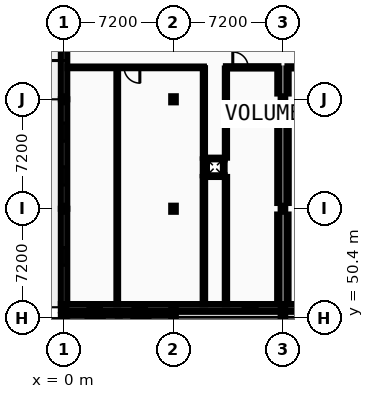
"""IFC4 building model, lengths in metres.
Left out: names, types, materials, properties, quantities, classifications, styles, units other than length and angle.
Written with IfcOpenShell. Run it as: python <this file> out.ifc"""

import sys

from ifc_helpers import new_model, si_unit, direction, frame, frame_2d, origin, origin_2d, place, context, subcontext, project, spatial, rectangle, i_section, extrude, element, fill, save


model = new_model("IFC4")
c1 = context("Model", 3, precision=1e-05, world=origin(), true_north=direction((0.0, 1.0)))
c2 = subcontext(c1, "Body", "Model", "MODEL_VIEW")
j1 = project(units=[si_unit("LENGTHUNIT", "METRE"), si_unit("PLANEANGLEUNIT", "RADIAN")], contexts=[c1])
p1 = place(None, origin())
s1 = spatial("IfcSite", under=j1, at=p1, CompositionType="ELEMENT")
p2 = place(p1, origin())
s2 = spatial("IfcBuilding", under=s1, at=p2, CompositionType="ELEMENT")
p3 = place(p2, origin())
s3 = spatial("IfcBuildingStorey", under=s2, at=p3, CompositionType="ELEMENT", Elevation=0.0)
p4 = place(p3, frame((0.0, 50.4, 0.0), z_axis=(0.0, 0.0, 1.0), x_axis=(1.0, 0.0, 0.0)))
e1 = element("IfcColumn", 1, at=p4, inside=s3, PredefinedType="COLUMN", context=c2, shape_type="SweptSolid", body=[
    extrude(i_section(OverallWidth=0.3, OverallDepth=0.45, WebThickness=0.014, FlangeThickness=0.026, FilletRadius=0.027, at=origin_2d()), origin(), (0.0, 0.0, 1.0), 5.2),
])
p5 = place(p3, frame((0.0, 51.12, 0.0), z_axis=(0.0, 0.0, 1.0), x_axis=(1.0, 0.0, 0.0)))
e2 = element("IfcColumn", 2, at=p5, inside=s3, PredefinedType="COLUMN", context=c2, shape_type="SweptSolid", body=[
    extrude(i_section(OverallWidth=0.3, OverallDepth=0.36, WebThickness=0.012, FlangeThickness=0.022, FilletRadius=0.027, at=origin_2d()), origin(), (0.0, 0.0, 1.0), 5.2),
])
for number, where, z_axis, x_axis in (
    (3, (0.0, 57.6, 0.0), (0.0, 0.0, 1.0), (1.0, 0.0, 0.0)),
    (4, (0.0, 64.8, 0.0), (0.0, 0.0, 1.0), (1.0, 0.0, 0.0)),
):
    element("IfcColumn", number, at=place(p3, frame(where, z_axis=z_axis, x_axis=x_axis)), inside=s3, PredefinedType="COLUMN", context=c2, shape_type="SweptSolid", body=[
        extrude(i_section(OverallWidth=0.3, OverallDepth=0.4, WebThickness=0.013, FlangeThickness=0.024, FilletRadius=0.027, at=origin_2d()), origin(), (0.0, 0.0, 1.0), 5.2),
    ])
p6 = place(p3, frame((7.2, 50.4, 0.0), z_axis=(0.0, 0.0, 1.0), x_axis=(1.0, 0.0, 0.0)))
e5 = element("IfcColumn", 5, at=p6, inside=s3, PredefinedType="COLUMN", context=c2, shape_type="SweptSolid", body=[
    extrude(i_section(OverallWidth=0.3, OverallDepth=0.45, WebThickness=0.014, FlangeThickness=0.026, FilletRadius=0.027, at=origin_2d()), origin(), (0.0, 0.0, 1.0), 5.2),
])
p7 = place(p3, frame((7.2, 51.12, 0.0), z_axis=(0.0, 0.0, 1.0), x_axis=(1.0, 0.0, 0.0)))
e6 = element("IfcColumn", 6, at=p7, inside=s3, PredefinedType="COLUMN", context=c2, shape_type="SweptSolid", body=[
    extrude(i_section(OverallWidth=0.3, OverallDepth=0.36, WebThickness=0.012, FlangeThickness=0.022, FilletRadius=0.027, at=origin_2d()), origin(), (0.0, 0.0, 1.0), 5.2),
])
for number, where, z_axis, x_axis in (
    (7, (7.2, 57.6, 0.0), (0.0, 0.0, 1.0), (1.0, 0.0, 0.0)),
    (8, (7.2, 64.8, 0.0), (0.0, 0.0, 1.0), (1.0, 0.0, 0.0)),
):
    element("IfcColumn", number, at=place(p3, frame(where, z_axis=z_axis, x_axis=x_axis)), inside=s3, PredefinedType="COLUMN", context=c2, shape_type="SweptSolid", body=[
        extrude(i_section(OverallWidth=0.3, OverallDepth=0.4, WebThickness=0.013, FlangeThickness=0.024, FilletRadius=0.027, at=origin_2d()), origin(), (0.0, 0.0, 1.0), 5.2),
    ])
p8 = place(p3, frame((14.4, 50.4, 0.0), z_axis=(0.0, 0.0, 1.0), x_axis=(1.0, 0.0, 0.0)))
e9 = element("IfcColumn", 9, at=p8, inside=s3, PredefinedType="COLUMN", context=c2, shape_type="SweptSolid", body=[
    extrude(i_section(OverallWidth=0.3, OverallDepth=0.45, WebThickness=0.014, FlangeThickness=0.026, FilletRadius=0.027, at=origin_2d()), origin(), (0.0, 0.0, 1.0), 5.2),
])
p9 = place(p3, frame((14.4, 51.12, 0.0), z_axis=(0.0, 0.0, 1.0), x_axis=(1.0, 0.0, 0.0)))
e10 = element("IfcColumn", 10, at=p9, inside=s3, PredefinedType="COLUMN", context=c2, shape_type="SweptSolid", body=[
    extrude(i_section(OverallWidth=0.3, OverallDepth=0.36, WebThickness=0.012, FlangeThickness=0.022, FilletRadius=0.027, at=origin_2d()), origin(), (0.0, 0.0, 1.0), 5.2),
])
for number, where, z_axis, x_axis in (
    (11, (14.4, 57.6, 0.0), (0.0, 0.0, 1.0), (1.0, 0.0, 0.0)),
    (12, (14.4, 64.8, 0.0), (0.0, 0.0, 1.0), (1.0, 0.0, 0.0)),
):
    element("IfcColumn", number, at=place(p3, frame(where, z_axis=z_axis, x_axis=x_axis)), inside=s3, PredefinedType="COLUMN", context=c2, shape_type="SweptSolid", body=[
        extrude(i_section(OverallWidth=0.3, OverallDepth=0.4, WebThickness=0.013, FlangeThickness=0.024, FilletRadius=0.027, at=origin_2d()), origin(), (0.0, 0.0, 1.0), 5.2),
    ])
p10 = place(p3, frame((7.31, 50.4, 0.0), z_axis=(0.0, 0.0, 1.0), x_axis=(-1.0, 0.0, 0.0)))
e13 = element("IfcWall", 13, at=p10, inside=s3, PredefinedType="STANDARD", context=c2, shape_type="SweptSolid", body=[
    extrude(rectangle(XDim=7.52, YDim=0.42, at=frame_2d((3.76, 0.0))), origin(), (0.0, 0.0, 1.0), 4.665),
])
p11 = place(p10, frame((1.656, 0.0, 0.9)))
e14 = element("IfcOpeningElement", 14, at=p11, cuts=e13, PredefinedType="OPENING", context=c2, shape_type="SweptSolid", body=[
    extrude(rectangle(XDim=1.2, YDim=1.8, at=frame_2d((0.6, 0.9))), frame((0.0, 0.22, 0.0), z_axis=(0.0, -1.0, 0.0), x_axis=(1.0, 0.0, 0.0)), (0.0, 0.0, 1.0), 0.44),
])
p12 = place(p10, frame((4.664, 0.0, 0.9)))
e15 = element("IfcOpeningElement", 15, at=p12, cuts=e13, PredefinedType="OPENING", context=c2, shape_type="SweptSolid", body=[
    extrude(rectangle(XDim=1.2, YDim=1.8, at=frame_2d((0.6, 0.9))), frame((0.0, 0.22, 0.0), z_axis=(0.0, -1.0, 0.0), x_axis=(1.0, 0.0, 0.0)), (0.0, 0.0, 1.0), 0.44),
])
p13 = place(p3, frame((-0.21, 51.12, 0.0), z_axis=(0.0, 0.0, 1.0), x_axis=(1.0, 0.0, 0.0)))
e16 = element("IfcWall", 16, at=p13, inside=s3, PredefinedType="STANDARD", context=c2, shape_type="SweptSolid", body=[
    extrude(rectangle(XDim=7.41, YDim=0.42, at=frame_2d((3.705, 0.0))), origin(), (0.0, 0.0, 1.0), 4.635),
])
p14 = place(p13, frame((1.776, 0.0, 0.95)))
e17 = element("IfcOpeningElement", 17, at=p14, cuts=e16, PredefinedType="OPENING", context=c2, shape_type="SweptSolid", body=[
    extrude(rectangle(XDim=0.894, YDim=1.404, at=frame_2d((0.447, 0.702))), frame((0.0, 0.22, 0.0), z_axis=(0.0, -1.0, 0.0), x_axis=(1.0, 0.0, 0.0)), (0.0, 0.0, 1.0), 0.44),
])
p15 = place(p13, frame((4.74, 0.0, 0.95)))
e18 = element("IfcOpeningElement", 18, at=p15, cuts=e16, PredefinedType="OPENING", context=c2, shape_type="SweptSolid", body=[
    extrude(rectangle(XDim=0.894, YDim=1.404, at=frame_2d((0.447, 0.702))), frame((0.0, 0.22, 0.0), z_axis=(0.0, -1.0, 0.0), x_axis=(1.0, 0.0, 0.0)), (0.0, 0.0, 1.0), 0.44),
])
p16 = place(p3, frame((7.2, 51.12, 0.0), z_axis=(0.0, 0.0, 1.0), x_axis=(1.0, 0.0, 0.0)))
e19 = element("IfcWall", 19, at=p16, inside=s3, PredefinedType="STANDARD", context=c2, shape_type="SweptSolid", body=[
    extrude(rectangle(XDim=7.2, YDim=0.42, at=frame_2d((3.6, 0.0))), origin(), (0.0, 0.0, 1.0), 4.635),
])
p17 = place(p16, frame((4.576, 0.0, 0.95)))
e20 = element("IfcOpeningElement", 20, at=p17, cuts=e19, PredefinedType="OPENING", context=c2, shape_type="SweptSolid", body=[
    extrude(rectangle(XDim=0.928, YDim=1.404, at=frame_2d((0.464, 0.702))), frame((0.0, 0.22, 0.0), z_axis=(0.0, -1.0, 0.0), x_axis=(1.0, 0.0, 0.0)), (0.0, 0.0, 1.0), 0.44),
])
p18 = place(p3, frame((14.4, 51.12, 0.0), z_axis=(0.0, 0.0, 1.0), x_axis=(1.0, 0.0, 0.0)))
e21 = element("IfcWall", 21, at=p18, inside=s3, PredefinedType="STANDARD", context=c2, shape_type="SweptSolid", body=[
    extrude(rectangle(XDim=7.2, YDim=0.42, at=frame_2d((3.6, 0.0))), origin(), (0.0, 0.0, 1.0), 4.635),
])
p19 = place(p18, frame((1.679, 0.0, 0.95)))
e22 = element("IfcOpeningElement", 22, at=p19, cuts=e21, PredefinedType="OPENING", context=c2, shape_type="SweptSolid", body=[
    extrude(rectangle(XDim=0.962, YDim=1.404, at=frame_2d((0.481, 0.702))), frame((0.0, 0.22, 0.0), z_axis=(0.0, -1.0, 0.0), x_axis=(1.0, 0.0, 0.0)), (0.0, 0.0, 1.0), 0.44),
])
p20 = place(p18, frame((4.559, 0.0, 0.95)))
e23 = element("IfcOpeningElement", 23, at=p20, cuts=e21, PredefinedType="OPENING", context=c2, shape_type="SweptSolid", body=[
    extrude(rectangle(XDim=0.962, YDim=1.404, at=frame_2d((0.481, 0.702))), frame((0.0, 0.22, 0.0), z_axis=(0.0, -1.0, 0.0), x_axis=(1.0, 0.0, 0.0)), (0.0, 0.0, 1.0), 0.44),
])
p21 = place(p3, frame((0.0, 57.6, 0.0), z_axis=(0.0, 0.0, 1.0), x_axis=(0.0, -1.0, 0.0)))
e24 = element("IfcWall", 24, at=p21, inside=s3, PredefinedType="STANDARD", context=c2, shape_type="SweptSolid", body=[
    extrude(rectangle(XDim=6.27, YDim=0.42, at=frame_2d((3.135, 0.0))), origin(), (0.0, 0.0, 1.0), 4.565),
])
p22 = place(p21, frame((2.552, 0.0, 0.95)))
e25 = element("IfcOpeningElement", 25, at=p22, cuts=e24, PredefinedType="OPENING", context=c2, shape_type="SweptSolid", body=[
    extrude(rectangle(XDim=1.166, YDim=1.404, at=frame_2d((0.583, 0.702))), frame((0.0, 0.22, 0.0), z_axis=(0.0, -1.0, 0.0), x_axis=(1.0, 0.0, 0.0)), (0.0, 0.0, 1.0), 0.44),
])
p23 = place(p3, frame((0.0, 64.8, 0.0), z_axis=(0.0, 0.0, 1.0), x_axis=(0.0, -1.0, 0.0)))
e26 = element("IfcWall", 26, at=p23, inside=s3, PredefinedType="STANDARD", context=c2, shape_type="SweptSolid", body=[
    extrude(rectangle(XDim=7.2, YDim=0.42, at=frame_2d((3.6, 0.0))), origin(), (0.0, 0.0, 1.0), 4.565),
])
p24 = place(p23, frame((1.56, 0.0, 0.95)))
e27 = element("IfcOpeningElement", 27, at=p24, cuts=e26, PredefinedType="OPENING", context=c2, shape_type="SweptSolid", body=[
    extrude(rectangle(XDim=1.2, YDim=1.404, at=frame_2d((0.6, 0.702))), frame((0.0, 0.22, 0.0), z_axis=(0.0, -1.0, 0.0), x_axis=(1.0, 0.0, 0.0)), (0.0, 0.0, 1.0), 0.44),
])
p25 = place(p23, frame((4.44, 0.0, 0.95)))
e28 = element("IfcOpeningElement", 28, at=p25, cuts=e26, PredefinedType="OPENING", context=c2, shape_type="SweptSolid", body=[
    extrude(rectangle(XDim=1.2, YDim=1.404, at=frame_2d((0.6, 0.702))), frame((0.0, 0.22, 0.0), z_axis=(0.0, -1.0, 0.0), x_axis=(1.0, 0.0, 0.0)), (0.0, 0.0, 1.0), 0.44),
])
p26 = place(p3, frame((0.0, 72.0, 0.0), z_axis=(0.0, 0.0, 1.0), x_axis=(0.0, -1.0, 0.0)))
e29 = element("IfcWall", 29, at=p26, inside=s3, PredefinedType="STANDARD", context=c2, shape_type="SweptSolid", body=[
    extrude(rectangle(XDim=7.2, YDim=0.42, at=frame_2d((3.6, 0.0))), origin(), (0.0, 0.0, 1.0), 4.565),
])
p27 = place(p26, frame((2.55, 0.0, 0.0)))
e30 = element("IfcOpeningElement", 30, at=p27, cuts=e29, PredefinedType="OPENING", context=c2, shape_type="SweptSolid", body=[
    extrude(rectangle(XDim=2.1, YDim=2.4, at=frame_2d((1.05, 1.2))), frame((0.0, 0.22, 0.0), z_axis=(0.0, -1.0, 0.0), x_axis=(1.0, 0.0, 0.0)), (0.0, 0.0, 1.0), 0.44),
])
for number, where, z_axis, x_axis in (
    (31, (9.29, 59.745, 0.0), (0.0, 0.0, 1.0), (1.0, 0.0, 0.0)),
    (32, (9.29, 60.905, 0.0), (0.0, 0.0, 1.0), (1.0, 0.0, 0.0)),
):
    element("IfcWall", number, at=place(p3, frame(where, z_axis=z_axis, x_axis=x_axis)), inside=s3, PredefinedType="PARTITIONING", context=c2, shape_type="SweptSolid", body=[
        extrude(rectangle(XDim=1.27, YDim=0.11, at=frame_2d((0.635, 0.0))), origin(), (0.0, 0.0, 1.0), 4.94),
    ])
for number, where, z_axis, x_axis in (
    (33, (9.345, 59.8, 0.0), (0.0, 0.0, 1.0), (0.0, 1.0, 0.0)),
    (34, (10.505, 59.8, 0.0), (0.0, 0.0, 1.0), (0.0, 1.0, 0.0)),
):
    element("IfcWall", number, at=place(p3, frame(where, z_axis=z_axis, x_axis=x_axis)), inside=s3, PredefinedType="PARTITIONING", context=c2, shape_type="SweptSolid", body=[
        extrude(rectangle(XDim=1.05, YDim=0.11, at=frame_2d((0.525, 0.0))), origin(), (0.0, 0.0, 1.0), 4.94),
    ])
p28 = place(p3, frame((0.23, 66.9, 0.0), z_axis=(0.0, 0.0, 1.0), x_axis=(1.0, 0.0, 0.0)))
e35 = element("IfcWall", 35, at=p28, inside=s3, PredefinedType="PARTITIONING", context=c2, shape_type="SweptSolid", body=[
    extrude(rectangle(XDim=8.97, YDim=0.11, at=frame_2d((4.485, 0.0))), origin(), (0.0, 0.0, 1.0), 4.94),
])
p29 = place(p28, frame((1.82, 0.0, 0.0)))
e36 = element("IfcOpeningElement", 36, at=p29, cuts=e35, PredefinedType="OPENING", context=c2, shape_type="SweptSolid", body=[
    extrude(rectangle(XDim=1.0, YDim=2.1, at=frame_2d((0.5, 1.05))), frame((0.0, 0.065, 0.0), z_axis=(0.0, -1.0, 0.0), x_axis=(1.0, 0.0, 0.0)), (0.0, 0.0, 1.0), 0.13),
])
p30 = place(p28, frame((3.72, 0.0, 0.0)))
e37 = element("IfcOpeningElement", 37, at=p30, cuts=e35, PredefinedType="OPENING", context=c2, shape_type="SweptSolid", body=[
    extrude(rectangle(XDim=1.036, YDim=2.096, at=frame_2d((0.518, 1.048))), frame((0.0, 0.065, 0.0), z_axis=(0.0, -1.0, 0.0), x_axis=(1.0, 0.0, 0.0)), (0.0, 0.0, 1.0), 0.13),
])
p31 = place(p3, frame((10.65, 66.9, 0.0), z_axis=(0.0, 0.0, 1.0), x_axis=(1.0, 0.0, 0.0)))
e38 = element("IfcWall", 38, at=p31, inside=s3, PredefinedType="PARTITIONING", context=c2, shape_type="SweptSolid", body=[
    extrude(rectangle(XDim=3.45, YDim=0.15, at=frame_2d((1.725, 0.0))), origin(), (0.0, 0.0, 1.0), 4.94),
])
p32 = place(p31, frame((0.45, 0.0, 0.0)))
e39 = element("IfcOpeningElement", 39, at=p32, cuts=e38, PredefinedType="OPENING", context=c2, shape_type="SweptSolid", body=[
    extrude(rectangle(XDim=1.01, YDim=2.096, at=frame_2d((0.505, 1.048))), frame((0.0, 0.085, 0.0), z_axis=(0.0, -1.0, 0.0), x_axis=(1.0, 0.0, 0.0)), (0.0, 0.0, 1.0), 0.17),
])
p33 = place(p3, frame((14.7, 66.9, 0.0), z_axis=(0.0, 0.0, 1.0), x_axis=(1.0, 0.0, 0.0)))
e40 = element("IfcWall", 40, at=p33, inside=s3, PredefinedType="PARTITIONING", context=c2, shape_type="SweptSolid", body=[
    extrude(rectangle(XDim=13.9, YDim=0.142, at=frame_2d((6.95, 0.0))), origin(), (0.0, 0.0, 1.0), 4.94),
])
p34 = place(p33, frame((10.319, 0.0, 0.0)))
e41 = element("IfcOpeningElement", 41, at=p34, cuts=e40, PredefinedType="OPENING", context=c2, shape_type="SweptSolid", body=[
    extrude(rectangle(XDim=1.062, YDim=2.096, at=frame_2d((0.531, 1.048))), frame((0.0, 0.081, 0.0), z_axis=(0.0, -1.0, 0.0), x_axis=(1.0, 0.0, 0.0)), (0.0, 0.0, 1.0), 0.162),
])
p35 = place(p33, frame((3.356, 0.0, 0.0)))
e42 = element("IfcOpeningElement", 42, at=p35, cuts=e40, PredefinedType="OPENING", context=c2, shape_type="SweptSolid", body=[
    extrude(rectangle(XDim=1.088, YDim=2.096, at=frame_2d((0.544, 1.048))), frame((0.0, 0.081, 0.0), z_axis=(0.0, -1.0, 0.0), x_axis=(1.0, 0.0, 0.0)), (0.0, 0.0, 1.0), 0.162),
])
p36 = place(p3, frame((3.5, 51.32, 0.0), z_axis=(0.0, 0.0, 1.0), x_axis=(0.0, 1.0, 0.0)))
e43 = element("IfcWall", 43, at=p36, inside=s3, PredefinedType="PARTITIONING", context=c2, shape_type="SweptSolid", body=[
    extrude(rectangle(XDim=15.525, YDim=0.11, at=frame_2d((7.762, 0.0))), origin(), (0.0, 0.0, 1.0), 4.94),
])
p37 = place(p3, frame((9.2, 51.32, 0.0), z_axis=(0.0, 0.0, 1.0), x_axis=(0.0, 1.0, 0.0)))
e44 = element("IfcWall", 44, at=p37, inside=s3, PredefinedType="PARTITIONING", context=c2, shape_type="SweptSolid", body=[
    extrude(rectangle(XDim=8.37, YDim=0.16, at=frame_2d((4.185, 0.0))), origin(), (0.0, 0.0, 1.0), 4.94),
])
p38 = place(p3, frame((9.2, 59.8, 0.0), z_axis=(0.0, 0.0, 1.0), x_axis=(0.0, 1.0, 0.0)))
e45 = element("IfcWall", 45, at=p38, inside=s3, PredefinedType="PARTITIONING", context=c2, shape_type="SweptSolid", body=[
    extrude(rectangle(XDim=1.05, YDim=0.15, at=frame_2d((0.525, 0.0))), origin(), (0.0, 0.0, 1.0), 4.94),
])
p39 = place(p3, frame((9.2, 60.96, 0.0), z_axis=(0.0, 0.0, 1.0), x_axis=(0.0, 1.0, 0.0)))
e46 = element("IfcWall", 46, at=p39, inside=s3, PredefinedType="PARTITIONING", context=c2, shape_type="SweptSolid", body=[
    extrude(rectangle(XDim=5.885, YDim=0.142, at=frame_2d((2.942, 0.0))), origin(), (0.0, 0.0, 1.0), 4.94),
])
p40 = place(p3, frame((10.65, 51.32, 0.0), z_axis=(0.0, 0.0, 1.0), x_axis=(0.0, 1.0, 0.0)))
e47 = element("IfcWall", 47, at=p40, inside=s3, PredefinedType="PARTITIONING", context=c2, shape_type="SweptSolid", body=[
    extrude(rectangle(XDim=8.37, YDim=0.15, at=frame_2d((4.185, 0.0))), origin(), (0.0, 0.0, 1.0), 4.94),
])
p41 = place(p3, frame((10.65, 60.96, 0.0), z_axis=(0.0, 0.0, 1.0), x_axis=(0.0, 1.0, 0.0)))
e48 = element("IfcWall", 48, at=p41, inside=s3, PredefinedType="PARTITIONING", context=c2, shape_type="SweptSolid", body=[
    extrude(rectangle(XDim=5.865, YDim=0.142, at=frame_2d((2.933, 0.0))), origin(), (0.0, 0.0, 1.0), 4.94),
])
p42 = place(p3, frame((14.1, 51.5, 0.0), z_axis=(0.0, 0.0, 1.0), x_axis=(0.0, 1.0, 0.0)))
e49 = element("IfcWall", 49, at=p42, inside=s3, PredefinedType="PARTITIONING", context=c2, shape_type="SweptSolid", body=[
    extrude(rectangle(XDim=5.72, YDim=0.16, at=frame_2d((2.86, 0.0))), origin(), (0.0, 0.0, 1.0), 4.635),
])
p43 = place(p3, frame((14.1, 57.98, 0.0), z_axis=(0.0, 0.0, 1.0), x_axis=(0.0, 1.0, 0.0)))
e50 = element("IfcWall", 50, at=p43, inside=s3, PredefinedType="PARTITIONING", context=c2, shape_type="SweptSolid", body=[
    extrude(rectangle(XDim=6.44, YDim=0.15, at=frame_2d((3.22, 0.0))), origin(), (0.0, 0.0, 1.0), 4.635),
])
p44 = place(p3, frame((14.1, 65.18, 0.0), z_axis=(0.0, 0.0, 1.0), x_axis=(0.0, 1.0, 0.0)))
e51 = element("IfcWall", 51, at=p44, inside=s3, PredefinedType="PARTITIONING", context=c2, shape_type="SweptSolid", body=[
    extrude(rectangle(XDim=1.645, YDim=0.142, at=frame_2d((0.823, 0.0))), origin(), (0.0, 0.0, 1.0), 4.635),
])
p45 = place(p3, frame((14.7, 51.5, 0.0), z_axis=(0.0, 0.0, 1.0), x_axis=(0.0, 1.0, 0.0)))
e52 = element("IfcWall", 52, at=p45, inside=s3, PredefinedType="PARTITIONING", context=c2, shape_type="SweptSolid", body=[
    extrude(rectangle(XDim=5.72, YDim=0.135, at=frame_2d((2.86, 0.0))), origin(), (0.0, 0.0, 1.0), 4.94),
])
p46 = place(p3, frame((14.7, 57.98, 0.0), z_axis=(0.0, 0.0, 1.0), x_axis=(0.0, 1.0, 0.0)))
e53 = element("IfcWall", 53, at=p46, inside=s3, PredefinedType="PARTITIONING", context=c2, shape_type="SweptSolid", body=[
    extrude(rectangle(XDim=6.44, YDim=0.16, at=frame_2d((3.22, 0.0))), origin(), (0.0, 0.0, 1.0), 4.635),
])
p47 = place(p3, frame((14.7, 65.18, 0.0), z_axis=(0.0, 0.0, 1.0), x_axis=(0.0, 1.0, 0.0)))
e54 = element("IfcWall", 54, at=p47, inside=s3, PredefinedType="PARTITIONING", context=c2, shape_type="SweptSolid", body=[
    extrude(rectangle(XDim=1.649, YDim=0.15, at=frame_2d((0.825, 0.0))), origin(), (0.0, 0.0, 1.0), 4.635),
])
p48 = place(p11, origin())
e55 = element("IfcWindow", 55, at=p48, inside=s3, PartitioningType="SINGLE_PANEL", PredefinedType="WINDOW", context=c2, shape_type="SweptSolid", body=[
    extrude(rectangle(XDim=1.2, YDim=1.8, at=frame_2d((0.6, 0.9))), frame((0.0, 0.03, 0.0), z_axis=(0.0, -1.0, 0.0), x_axis=(1.0, 0.0, 0.0)), (0.0, 0.0, 1.0), 0.06),
])
fill(e14, e55)
p49 = place(p12, origin())
e56 = element("IfcWindow", 56, at=p49, inside=s3, PartitioningType="SINGLE_PANEL", PredefinedType="WINDOW", context=c2, shape_type="SweptSolid", body=[
    extrude(rectangle(XDim=1.2, YDim=1.8, at=frame_2d((0.6, 0.9))), frame((0.0, 0.03, 0.0), z_axis=(0.0, -1.0, 0.0), x_axis=(1.0, 0.0, 0.0)), (0.0, 0.0, 1.0), 0.06),
])
fill(e15, e56)
p50 = place(p14, origin())
e57 = element("IfcWindow", 57, at=p50, inside=s3, PartitioningType="SINGLE_PANEL", PredefinedType="WINDOW", context=c2, shape_type="SweptSolid", body=[
    extrude(rectangle(XDim=0.894, YDim=1.404, at=frame_2d((0.447, 0.702))), frame((0.0, 0.03, 0.0), z_axis=(0.0, -1.0, 0.0), x_axis=(1.0, 0.0, 0.0)), (0.0, 0.0, 1.0), 0.06),
])
fill(e17, e57)
p51 = place(p15, origin())
e58 = element("IfcWindow", 58, at=p51, inside=s3, PartitioningType="SINGLE_PANEL", PredefinedType="WINDOW", context=c2, shape_type="SweptSolid", body=[
    extrude(rectangle(XDim=0.894, YDim=1.404, at=frame_2d((0.447, 0.702))), frame((0.0, 0.03, 0.0), z_axis=(0.0, -1.0, 0.0), x_axis=(1.0, 0.0, 0.0)), (0.0, 0.0, 1.0), 0.06),
])
fill(e18, e58)
p52 = place(p17, origin())
e59 = element("IfcWindow", 59, at=p52, inside=s3, PartitioningType="SINGLE_PANEL", PredefinedType="WINDOW", context=c2, shape_type="SweptSolid", body=[
    extrude(rectangle(XDim=0.928, YDim=1.404, at=frame_2d((0.464, 0.702))), frame((0.0, 0.03, 0.0), z_axis=(0.0, -1.0, 0.0), x_axis=(1.0, 0.0, 0.0)), (0.0, 0.0, 1.0), 0.06),
])
fill(e20, e59)
p53 = place(p22, origin())
e60 = element("IfcWindow", 60, at=p53, inside=s3, PartitioningType="SINGLE_PANEL", PredefinedType="WINDOW", context=c2, shape_type="SweptSolid", body=[
    extrude(rectangle(XDim=1.166, YDim=1.404, at=frame_2d((0.583, 0.702))), frame((0.0, 0.03, 0.0), z_axis=(0.0, -1.0, 0.0), x_axis=(1.0, 0.0, 0.0)), (0.0, 0.0, 1.0), 0.06),
])
fill(e25, e60)
p54 = place(p24, origin())
e61 = element("IfcWindow", 61, at=p54, inside=s3, PartitioningType="SINGLE_PANEL", PredefinedType="WINDOW", context=c2, shape_type="SweptSolid", body=[
    extrude(rectangle(XDim=1.2, YDim=1.404, at=frame_2d((0.6, 0.702))), frame((0.0, 0.03, 0.0), z_axis=(0.0, -1.0, 0.0), x_axis=(1.0, 0.0, 0.0)), (0.0, 0.0, 1.0), 0.06),
])
fill(e27, e61)
p55 = place(p25, origin())
e62 = element("IfcWindow", 62, at=p55, inside=s3, PartitioningType="SINGLE_PANEL", PredefinedType="WINDOW", context=c2, shape_type="SweptSolid", body=[
    extrude(rectangle(XDim=1.2, YDim=1.404, at=frame_2d((0.6, 0.702))), frame((0.0, 0.03, 0.0), z_axis=(0.0, -1.0, 0.0), x_axis=(1.0, 0.0, 0.0)), (0.0, 0.0, 1.0), 0.06),
])
fill(e28, e62)
p56 = place(p27, origin())
e63 = element("IfcDoor", 63, at=p56, inside=s3, OperationType="DOUBLE_DOOR_SINGLE_SWING", PredefinedType="DOOR", context=c2, shape_type="SweptSolid", body=[
    extrude(rectangle(XDim=2.1, YDim=2.4, at=frame_2d((1.05, 1.2))), frame((0.0, 0.025, 0.0), z_axis=(0.0, -1.0, 0.0), x_axis=(1.0, 0.0, 0.0)), (0.0, 0.0, 1.0), 0.05),
])
fill(e30, e63)
p57 = place(p29, origin())
e64 = element("IfcDoor", 64, at=p57, inside=s3, OperationType="SLIDING_TO_LEFT", PredefinedType="DOOR", context=c2, shape_type="SweptSolid", body=[
    extrude(rectangle(XDim=1.0, YDim=2.1, at=frame_2d((0.5, 1.05))), frame((0.0, 0.025, 0.0), z_axis=(0.0, -1.0, 0.0), x_axis=(1.0, 0.0, 0.0)), (0.0, 0.0, 1.0), 0.05),
])
fill(e36, e64)
p58 = place(p32, origin())
e65 = element("IfcDoor", 65, at=p58, inside=s3, OperationType="SINGLE_SWING_LEFT", PredefinedType="DOOR", context=c2, shape_type="SweptSolid", body=[
    extrude(rectangle(XDim=1.01, YDim=2.096, at=frame_2d((0.505, 1.048))), frame((0.0, 0.025, 0.0), z_axis=(0.0, -1.0, 0.0), x_axis=(1.0, 0.0, 0.0)), (0.0, 0.0, 1.0), 0.05),
])
fill(e39, e65)
p59 = place(p30, origin())
e66 = element("IfcDoor", 66, at=p59, inside=s3, OperationType="SINGLE_SWING_RIGHT", PredefinedType="DOOR", context=c2, shape_type="SweptSolid", body=[
    extrude(rectangle(XDim=1.036, YDim=2.096, at=frame_2d((0.518, 1.048))), frame((0.0, 0.025, 0.0), z_axis=(0.0, -1.0, 0.0), x_axis=(1.0, 0.0, 0.0)), (0.0, 0.0, 1.0), 0.05),
])
fill(e37, e66)
save(model, sys.argv[1])
